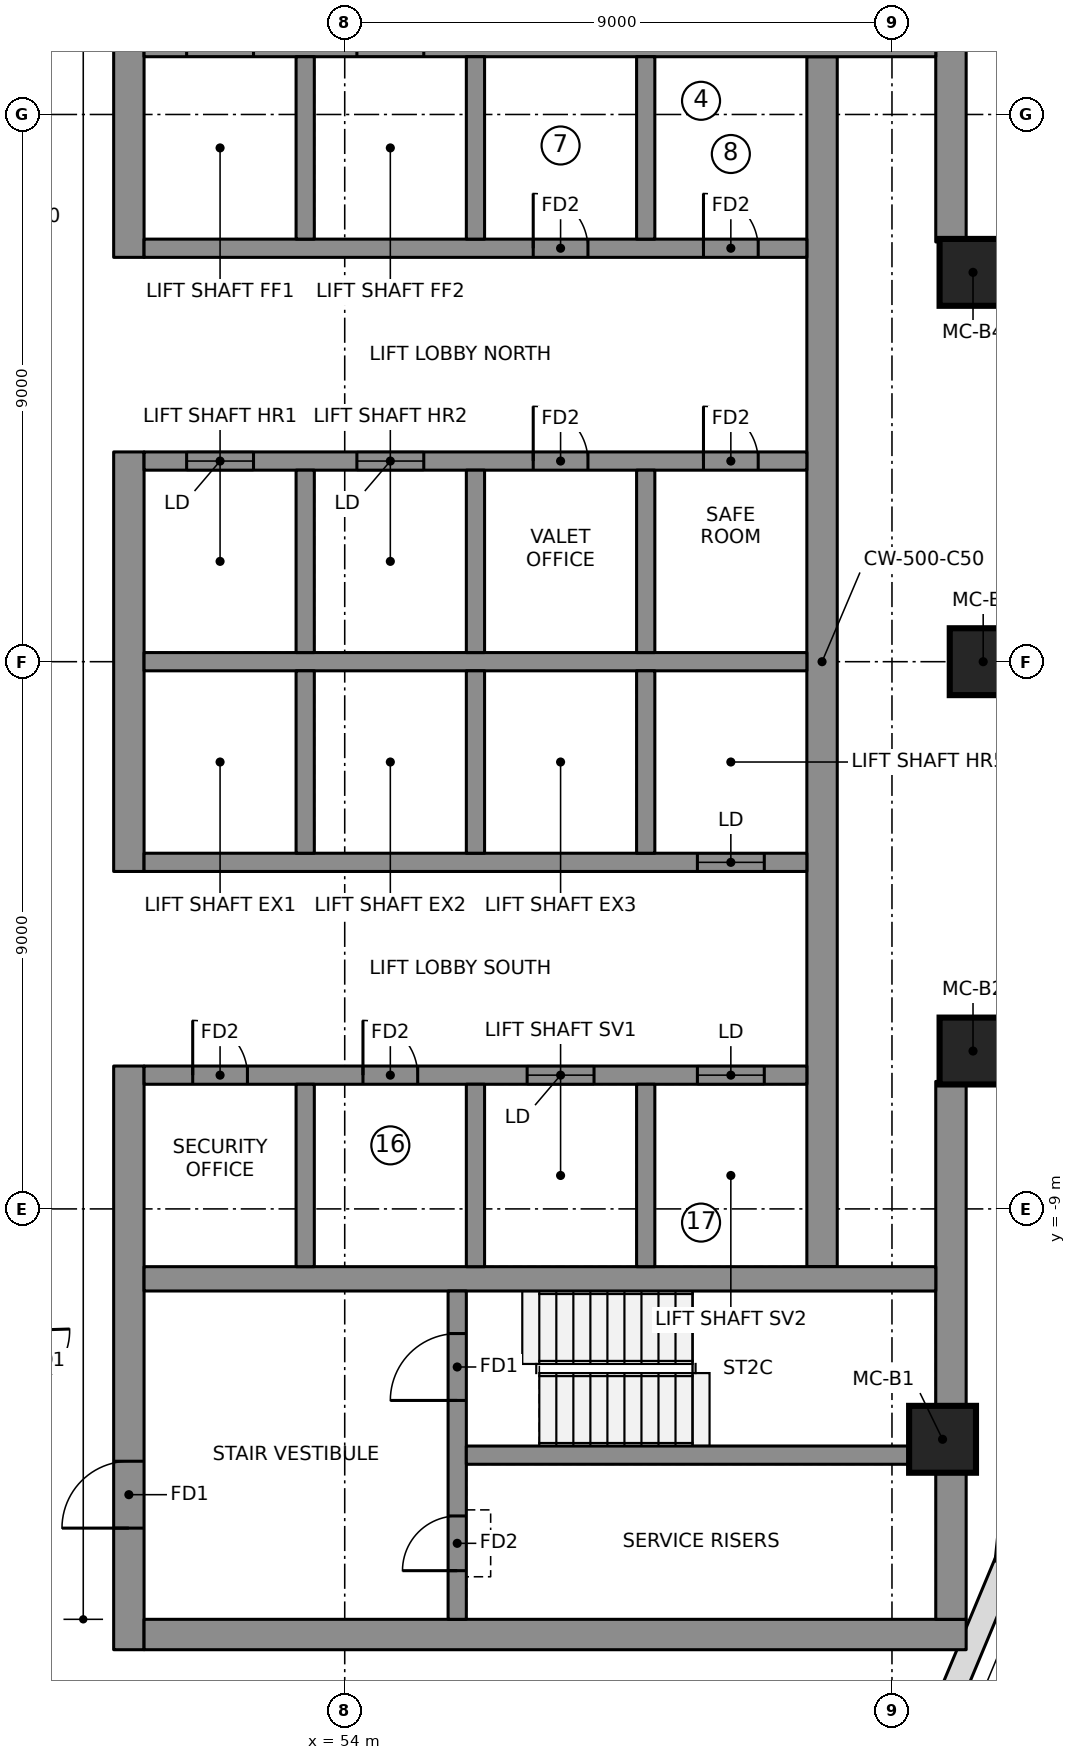
"""IFC4 building model, lengths in metres.
Left out: names, types, materials, properties, quantities, classifications, styles, units other than length and angle.
Written with IfcOpenShell. Run it as: python <this file> out.ifc"""

import sys

from ifc_helpers import new_model, si_unit, direction, frame, frame_2d, origin, origin_2d, place, context, subcontext, project, spatial, polyline, rectangle, outline, extrude, element, fill, save


model = new_model("IFC4")
c1 = context("Model", 3, precision=1e-05, world=origin(), true_north=direction((0.0, 1.0)))
c2 = subcontext(c1, "Body", "Model", "MODEL_VIEW")
j1 = project(units=[si_unit("LENGTHUNIT", "METRE"), si_unit("PLANEANGLEUNIT", "RADIAN")], contexts=[c1])
p1 = place(None, origin())
s1 = spatial("IfcSite", under=j1, at=p1, CompositionType="ELEMENT")
p2 = place(p1, origin())
s2 = spatial("IfcBuilding", under=s1, at=p2, CompositionType="ELEMENT")
p3 = place(p2, frame((0.0, 0.0, 285.65)))
s3 = spatial("IfcBuildingStorey", under=s2, at=p3, CompositionType="ELEMENT", Elevation=285.65)
p4 = place(p3, frame((50.45, 6.65, 0.0), z_axis=(0.0, 0.0, 1.0), x_axis=(0.0, 1.0, 0.0)))
e1 = element("IfcWall", 1, at=p4, inside=s3, PredefinedType="SHEAR", context=c2, shape_type="SweptSolid", body=[
    extrude(rectangle(XDim=9.6, YDim=0.5, at=frame_2d((4.8, 0.0))), origin(), (0.0, 0.0, 1.0), 3.55),
])
p5 = place(p4, frame((6.5, 0.0, 0.0)))
e2 = element("IfcOpeningElement", 2, at=p5, cuts=e1, PredefinedType="OPENING", context=c2, shape_type="SweptSolid", body=[
    extrude(rectangle(XDim=1.1, YDim=2.1, at=frame_2d((0.55, 1.05))), frame((0.0, 0.26, 0.0), z_axis=(0.0, -1.0, 0.0), x_axis=(1.0, 0.0, 0.0)), (0.0, 0.0, 1.0), 0.52),
])
p6 = place(p3, frame((50.45, -3.45, 0.0), z_axis=(0.0, 0.0, 1.0), x_axis=(0.0, 1.0, 0.0)))
e3 = element("IfcWall", 3, at=p6, inside=s3, PredefinedType="SHEAR", context=c2, shape_type="SweptSolid", body=[
    extrude(rectangle(XDim=6.9, YDim=0.5, at=frame_2d((3.45, 0.0))), origin(), (0.0, 0.0, 1.0), 3.55),
])
p7 = place(p3, frame((50.45, -16.25, 0.0), z_axis=(0.0, 0.0, 1.0), x_axis=(0.0, 1.0, 0.0)))
e4 = element("IfcWall", 4, at=p7, inside=s3, PredefinedType="SHEAR", context=c2, shape_type="SweptSolid", body=[
    extrude(rectangle(XDim=9.6, YDim=0.5, at=frame_2d((4.8, 0.0))), origin(), (0.0, 0.0, 1.0), 3.55),
])
p8 = place(p7, frame((2.0, 0.0, 0.0)))
e5 = element("IfcOpeningElement", 5, at=p8, cuts=e4, PredefinedType="OPENING", context=c2, shape_type="SweptSolid", body=[
    extrude(rectangle(XDim=1.1, YDim=2.1, at=frame_2d((0.55, 1.05))), frame((0.0, 0.26, 0.0), z_axis=(0.0, -1.0, 0.0), x_axis=(1.0, 0.0, 0.0)), (0.0, 0.0, 1.0), 0.52),
])
p9 = place(p3, frame((50.7, -16.0, 0.0), z_axis=(0.0, 0.0, 1.0), x_axis=(1.0, 0.0, 0.0)))
e6 = element("IfcWall", 6, at=p9, inside=s3, PredefinedType="SHEAR", context=c2, shape_type="SweptSolid", body=[
    extrude(rectangle(XDim=13.52, YDim=0.5, at=frame_2d((6.76, 0.0))), origin(), (0.0, 0.0, 1.0), 3.55),
])
for number, where, z_axis, x_axis in (
    (7, (63.97, 6.903, 0.0), (0.0, 0.0, 1.0), (0.0, 1.0, 0.0)),
    (8, (63.97, -15.75, 0.0), (0.0, 0.0, 1.0), (0.0, 1.0, 0.0)),
):
    element("IfcWall", number, at=place(p3, frame(where, z_axis=z_axis, x_axis=x_axis)), inside=s3, PredefinedType="SHEAR", context=c2, shape_type="SweptSolid", body=[
        extrude(rectangle(XDim=8.847, YDim=0.5, at=frame_2d((4.423, 0.0))), origin(), (0.0, 0.0, 1.0), 3.55),
    ])
p10 = place(p3, frame((61.85, -9.95, 0.0), z_axis=(0.0, 0.0, 1.0), x_axis=(0.0, 1.0, 0.0)))
e9 = element("IfcWall", 9, at=p10, inside=s3, PredefinedType="SHEAR", context=c2, shape_type="SweptSolid", body=[
    extrude(rectangle(XDim=19.9, YDim=0.5, at=frame_2d((9.95, 0.0))), origin(), (0.0, 0.0, 1.0), 3.55),
])
p11 = place(p3, frame((50.7, 10.15, 0.0), z_axis=(0.0, 0.0, 1.0), x_axis=(1.0, 0.0, 0.0)))
e10 = element("IfcWall", 10, at=p11, inside=s3, PredefinedType="SHEAR", context=c2, shape_type="SweptSolid", body=[
    extrude(rectangle(XDim=13.02, YDim=0.4, at=frame_2d((6.51, 0.0))), origin(), (0.0, 0.0, 1.0), 3.55),
])
p12 = place(p11, frame((0.7, 0.0, 0.0)))
e11 = element("IfcOpeningElement", 11, at=p12, cuts=e10, PredefinedType="OPENING", context=c2, shape_type="SweptSolid", body=[
    extrude(rectangle(XDim=1.1, YDim=2.1, at=frame_2d((0.55, 1.05))), frame((0.0, 0.21, 0.0), z_axis=(0.0, -1.0, 0.0), x_axis=(1.0, 0.0, 0.0)), (0.0, 0.0, 1.0), 0.42),
])
p13 = place(p11, frame((3.5, 0.0, 0.0)))
e12 = element("IfcOpeningElement", 12, at=p13, cuts=e10, PredefinedType="OPENING", context=c2, shape_type="SweptSolid", body=[
    extrude(rectangle(XDim=1.1, YDim=2.1, at=frame_2d((0.55, 1.05))), frame((0.0, 0.21, 0.0), z_axis=(0.0, -1.0, 0.0), x_axis=(1.0, 0.0, 0.0)), (0.0, 0.0, 1.0), 0.42),
])
p14 = place(p3, frame((50.7, -10.15, 0.0), z_axis=(0.0, 0.0, 1.0), x_axis=(1.0, 0.0, 0.0)))
e13 = element("IfcWall", 13, at=p14, inside=s3, PredefinedType="SHEAR", context=c2, shape_type="SweptSolid", body=[
    extrude(rectangle(XDim=13.02, YDim=0.4, at=frame_2d((6.51, 0.0))), origin(), (0.0, 0.0, 1.0), 3.55),
])
p15 = place(p3, frame((50.7, 0.0, 0.0), z_axis=(0.0, 0.0, 1.0), x_axis=(1.0, 0.0, 0.0)))
e14 = element("IfcWall", 14, at=p15, inside=s3, PredefinedType="SHEAR", context=c2, shape_type="SweptSolid", body=[
    extrude(rectangle(XDim=10.9, YDim=0.3, at=frame_2d((5.45, 0.0))), origin(), (0.0, 0.0, 1.0), 3.55),
])
p16 = place(p3, frame((50.7, 3.3, 0.0), z_axis=(0.0, 0.0, 1.0), x_axis=(1.0, 0.0, 0.0)))
e15 = element("IfcWall", 15, at=p16, inside=s3, PredefinedType="SHEAR", context=c2, shape_type="SweptSolid", body=[
    extrude(rectangle(XDim=10.9, YDim=0.3, at=frame_2d((5.45, 0.0))), origin(), (0.0, 0.0, 1.0), 3.55),
])
p17 = place(p16, frame((0.7, 0.0, 0.0)))
e16 = element("IfcOpeningElement", 16, at=p17, cuts=e15, PredefinedType="OPENING", context=c2, shape_type="SweptSolid", body=[
    extrude(rectangle(XDim=1.1, YDim=2.1, at=frame_2d((0.55, 1.05))), frame((0.0, 0.16, 0.0), z_axis=(0.0, -1.0, 0.0), x_axis=(1.0, 0.0, 0.0)), (0.0, 0.0, 1.0), 0.32),
])
p18 = place(p16, frame((3.5, 0.0, 0.0)))
e17 = element("IfcOpeningElement", 17, at=p18, cuts=e15, PredefinedType="OPENING", context=c2, shape_type="SweptSolid", body=[
    extrude(rectangle(XDim=1.1, YDim=2.1, at=frame_2d((0.55, 1.05))), frame((0.0, 0.16, 0.0), z_axis=(0.0, -1.0, 0.0), x_axis=(1.0, 0.0, 0.0)), (0.0, 0.0, 1.0), 0.32),
])
p19 = place(p16, frame((6.4, 0.0, 0.0)))
e18 = element("IfcOpeningElement", 18, at=p19, cuts=e15, PredefinedType="OPENING", context=c2, shape_type="SweptSolid", body=[
    extrude(rectangle(XDim=0.9, YDim=2.1, at=frame_2d((0.45, 1.05))), frame((0.0, 0.16, 0.0), z_axis=(0.0, -1.0, 0.0), x_axis=(1.0, 0.0, 0.0)), (0.0, 0.0, 1.0), 0.32),
])
p20 = place(p16, frame((9.2, 0.0, 0.0)))
e19 = element("IfcOpeningElement", 19, at=p20, cuts=e15, PredefinedType="OPENING", context=c2, shape_type="SweptSolid", body=[
    extrude(rectangle(XDim=0.9, YDim=2.1, at=frame_2d((0.45, 1.05))), frame((0.0, 0.16, 0.0), z_axis=(0.0, -1.0, 0.0), x_axis=(1.0, 0.0, 0.0)), (0.0, 0.0, 1.0), 0.32),
])
p21 = place(p3, frame((50.7, 6.8, 0.0), z_axis=(0.0, 0.0, 1.0), x_axis=(1.0, 0.0, 0.0)))
e20 = element("IfcWall", 20, at=p21, inside=s3, PredefinedType="SHEAR", context=c2, shape_type="SweptSolid", body=[
    extrude(rectangle(XDim=10.9, YDim=0.3, at=frame_2d((5.45, 0.0))), origin(), (0.0, 0.0, 1.0), 3.55),
])
p22 = place(p21, frame((6.4, 0.0, 0.0)))
e21 = element("IfcOpeningElement", 21, at=p22, cuts=e20, PredefinedType="OPENING", context=c2, shape_type="SweptSolid", body=[
    extrude(rectangle(XDim=0.9, YDim=2.1, at=frame_2d((0.45, 1.05))), frame((0.0, 0.16, 0.0), z_axis=(0.0, -1.0, 0.0), x_axis=(1.0, 0.0, 0.0)), (0.0, 0.0, 1.0), 0.32),
])
p23 = place(p21, frame((9.2, 0.0, 0.0)))
e22 = element("IfcOpeningElement", 22, at=p23, cuts=e20, PredefinedType="OPENING", context=c2, shape_type="SweptSolid", body=[
    extrude(rectangle(XDim=0.9, YDim=2.1, at=frame_2d((0.45, 1.05))), frame((0.0, 0.16, 0.0), z_axis=(0.0, -1.0, 0.0), x_axis=(1.0, 0.0, 0.0)), (0.0, 0.0, 1.0), 0.32),
])
for number, where, z_axis, x_axis in (
    (23, (53.35, 0.15, 0.0), (0.0, 0.0, 1.0), (0.0, 1.0, 0.0)),
    (24, (53.35, 6.95, 0.0), (0.0, 0.0, 1.0), (0.0, 1.0, 0.0)),
    (25, (56.15, 0.15, 0.0), (0.0, 0.0, 1.0), (0.0, 1.0, 0.0)),
    (26, (56.15, 6.95, 0.0), (0.0, 0.0, 1.0), (0.0, 1.0, 0.0)),
    (27, (58.95, 0.15, 0.0), (0.0, 0.0, 1.0), (0.0, 1.0, 0.0)),
    (28, (58.95, 6.95, 0.0), (0.0, 0.0, 1.0), (0.0, 1.0, 0.0)),
):
    element("IfcWall", number, at=place(p3, frame(where, z_axis=z_axis, x_axis=x_axis)), inside=s3, PredefinedType="SHEAR", context=c2, shape_type="SweptSolid", body=[
        extrude(rectangle(XDim=3.0, YDim=0.3, at=frame_2d((1.5, 0.0))), origin(), (0.0, 0.0, 1.0), 3.55),
    ])
p24 = place(p3, frame((50.7, -3.3, 0.0), z_axis=(0.0, 0.0, 1.0), x_axis=(1.0, 0.0, 0.0)))
e29 = element("IfcWall", 29, at=p24, inside=s3, PredefinedType="SHEAR", context=c2, shape_type="SweptSolid", body=[
    extrude(rectangle(XDim=10.9, YDim=0.3, at=frame_2d((5.45, 0.0))), origin(), (0.0, 0.0, 1.0), 3.55),
])
p25 = place(p24, frame((9.1, 0.0, 0.0)))
e30 = element("IfcOpeningElement", 30, at=p25, cuts=e29, PredefinedType="OPENING", context=c2, shape_type="SweptSolid", body=[
    extrude(rectangle(XDim=1.1, YDim=2.1, at=frame_2d((0.55, 1.05))), frame((0.0, 0.16, 0.0), z_axis=(0.0, -1.0, 0.0), x_axis=(1.0, 0.0, 0.0)), (0.0, 0.0, 1.0), 0.32),
])
p26 = place(p3, frame((50.7, -6.8, 0.0), z_axis=(0.0, 0.0, 1.0), x_axis=(1.0, 0.0, 0.0)))
e31 = element("IfcWall", 31, at=p26, inside=s3, PredefinedType="SHEAR", context=c2, shape_type="SweptSolid", body=[
    extrude(rectangle(XDim=10.9, YDim=0.3, at=frame_2d((5.45, 0.0))), origin(), (0.0, 0.0, 1.0), 3.55),
])
p27 = place(p26, frame((6.3, 0.0, 0.0)))
e32 = element("IfcOpeningElement", 32, at=p27, cuts=e31, PredefinedType="OPENING", context=c2, shape_type="SweptSolid", body=[
    extrude(rectangle(XDim=1.1, YDim=2.1, at=frame_2d((0.55, 1.05))), frame((0.0, 0.16, 0.0), z_axis=(0.0, -1.0, 0.0), x_axis=(1.0, 0.0, 0.0)), (0.0, 0.0, 1.0), 0.32),
])
p28 = place(p26, frame((9.1, 0.0, 0.0)))
e33 = element("IfcOpeningElement", 33, at=p28, cuts=e31, PredefinedType="OPENING", context=c2, shape_type="SweptSolid", body=[
    extrude(rectangle(XDim=1.1, YDim=2.1, at=frame_2d((0.55, 1.05))), frame((0.0, 0.16, 0.0), z_axis=(0.0, -1.0, 0.0), x_axis=(1.0, 0.0, 0.0)), (0.0, 0.0, 1.0), 0.32),
])
p29 = place(p26, frame((0.8, 0.0, 0.0)))
e34 = element("IfcOpeningElement", 34, at=p29, cuts=e31, PredefinedType="OPENING", context=c2, shape_type="SweptSolid", body=[
    extrude(rectangle(XDim=0.9, YDim=2.1, at=frame_2d((0.45, 1.05))), frame((0.0, 0.16, 0.0), z_axis=(0.0, -1.0, 0.0), x_axis=(1.0, 0.0, 0.0)), (0.0, 0.0, 1.0), 0.32),
])
p30 = place(p26, frame((3.6, 0.0, 0.0)))
e35 = element("IfcOpeningElement", 35, at=p30, cuts=e31, PredefinedType="OPENING", context=c2, shape_type="SweptSolid", body=[
    extrude(rectangle(XDim=0.9, YDim=2.1, at=frame_2d((0.45, 1.05))), frame((0.0, 0.16, 0.0), z_axis=(0.0, -1.0, 0.0), x_axis=(1.0, 0.0, 0.0)), (0.0, 0.0, 1.0), 0.32),
])
for number, where, z_axis, x_axis in (
    (36, (53.35, -3.15, 0.0), (0.0, 0.0, 1.0), (0.0, 1.0, 0.0)),
    (37, (53.35, -9.95, 0.0), (0.0, 0.0, 1.0), (0.0, 1.0, 0.0)),
    (38, (56.15, -3.15, 0.0), (0.0, 0.0, 1.0), (0.0, 1.0, 0.0)),
    (39, (56.15, -9.95, 0.0), (0.0, 0.0, 1.0), (0.0, 1.0, 0.0)),
    (40, (58.95, -3.15, 0.0), (0.0, 0.0, 1.0), (0.0, 1.0, 0.0)),
    (41, (58.95, -9.95, 0.0), (0.0, 0.0, 1.0), (0.0, 1.0, 0.0)),
):
    element("IfcWall", number, at=place(p3, frame(where, z_axis=z_axis, x_axis=x_axis)), inside=s3, PredefinedType="SHEAR", context=c2, shape_type="SweptSolid", body=[
        extrude(rectangle(XDim=3.0, YDim=0.3, at=frame_2d((1.5, 0.0))), origin(), (0.0, 0.0, 1.0), 3.55),
    ])
p31 = place(p3, frame((55.85, -15.75, 0.0), z_axis=(0.0, 0.0, 1.0), x_axis=(0.0, 1.0, 0.0)))
e42 = element("IfcWall", 42, at=p31, inside=s3, PredefinedType="SHEAR", context=c2, shape_type="SweptSolid", body=[
    extrude(rectangle(XDim=5.4, YDim=0.3, at=frame_2d((2.7, 0.0))), origin(), (0.0, 0.0, 1.0), 3.55),
])
p32 = place(p31, frame((3.6, 0.0, 0.0)))
e43 = element("IfcOpeningElement", 43, at=p32, cuts=e42, PredefinedType="OPENING", context=c2, shape_type="SweptSolid", body=[
    extrude(rectangle(XDim=1.1, YDim=2.1, at=frame_2d((0.55, 1.05))), frame((0.0, 0.16, 0.0), z_axis=(0.0, -1.0, 0.0), x_axis=(1.0, 0.0, 0.0)), (0.0, 0.0, 1.0), 0.32),
])
p33 = place(p31, frame((0.8, 0.0, 0.0)))
e44 = element("IfcOpeningElement", 44, at=p33, cuts=e42, PredefinedType="OPENING", context=c2, shape_type="SweptSolid", body=[
    extrude(rectangle(XDim=0.9, YDim=2.1, at=frame_2d((0.45, 1.05))), frame((0.0, 0.16, 0.0), z_axis=(0.0, -1.0, 0.0), x_axis=(1.0, 0.0, 0.0)), (0.0, 0.0, 1.0), 0.32),
])
p34 = place(p3, frame((56.0, -13.05, 0.0), z_axis=(0.0, 0.0, 1.0), x_axis=(1.0, 0.0, 0.0)))
e45 = element("IfcWall", 45, at=p34, inside=s3, PredefinedType="SHEAR", context=c2, shape_type="SweptSolid", body=[
    extrude(rectangle(XDim=7.72, YDim=0.3, at=frame_2d((3.86, 0.0))), origin(), (0.0, 0.0, 1.0), 3.55),
])
for number, where, z_axis, x_axis in (
    (46, (63.832, -12.789, 0.0), (0.0, 0.0, 1.0), (1.0, 0.0, 0.0)),
    (47, (64.333, -6.403, 0.0), (0.0, 0.0, 1.0), (1.0, 0.0, 0.0)),
    (48, (64.5, 0.0, 0.0), (0.0, 0.0, 1.0), (1.0, 0.0, 0.0)),
    (49, (64.333, 6.403, 0.0), (0.0, 0.0, 1.0), (1.0, 0.0, 0.0)),
):
    element("IfcColumn", number, at=place(p3, frame(where, z_axis=z_axis, x_axis=x_axis)), inside=s3, PredefinedType="COLUMN", context=c2, shape_type="SweptSolid", body=[
        extrude(rectangle(XDim=1.1, YDim=1.1, at=origin_2d()), origin(), (0.0, 0.0, 1.0), 3.55),
    ])
p35 = place(p3, frame((63.474, -18.194, 0.0), z_axis=(0.0, 0.0, 1.0), x_axis=(0.385285857918, 0.922797273343, 0.0)))
e50 = element("IfcWall", 50, at=p35, inside=s3, PredefinedType="NOTDEFINED", context=c2, shape_type="SweptSolid", body=[
    extrude(outline(polyline([(-0.057, -0.2), (3.726, -0.2), (3.667, 0.2), (0.057, 0.2), (-0.057, -0.2)])), origin(), (0.0, 0.0, 1.0), 3.25),
])
p36 = place(p3, frame((64.898, -14.782, 0.0), z_axis=(0.0, 0.0, 1.0), x_axis=(0.102249826987, 0.994758751096, 0.0)))
e51 = element("IfcWall", 51, at=p36, inside=s3, PredefinedType="NOTDEFINED", context=c2, shape_type="SweptSolid", body=[
    extrude(outline(polyline([(-0.03, -0.2), (4.237, -0.2), (4.23, 0.2), (0.03, 0.2), (-0.03, -0.2)])), origin(), (0.0, 0.0, 1.0), 3.25),
])
p37 = place(p17, origin())
e52 = element("IfcDoor", 52, at=p37, inside=s3, OperationType="DOUBLE_DOOR_SLIDING", PredefinedType="DOOR", context=c2, shape_type="SweptSolid", body=[
    extrude(rectangle(XDim=1.1, YDim=2.1, at=frame_2d((0.55, 1.05))), frame((0.0, 0.025, 0.0), z_axis=(0.0, -1.0, 0.0), x_axis=(1.0, 0.0, 0.0)), (0.0, 0.0, 1.0), 0.05),
])
fill(e16, e52)
p38 = place(p18, origin())
e53 = element("IfcDoor", 53, at=p38, inside=s3, OperationType="DOUBLE_DOOR_SLIDING", PredefinedType="DOOR", context=c2, shape_type="SweptSolid", body=[
    extrude(rectangle(XDim=1.1, YDim=2.1, at=frame_2d((0.55, 1.05))), frame((0.0, 0.025, 0.0), z_axis=(0.0, -1.0, 0.0), x_axis=(1.0, 0.0, 0.0)), (0.0, 0.0, 1.0), 0.05),
])
fill(e17, e53)
p39 = place(p25, origin())
e54 = element("IfcDoor", 54, at=p39, inside=s3, OperationType="DOUBLE_DOOR_SLIDING", PredefinedType="DOOR", context=c2, shape_type="SweptSolid", body=[
    extrude(rectangle(XDim=1.1, YDim=2.1, at=frame_2d((0.55, 1.05))), frame((0.0, 0.025, 0.0), z_axis=(0.0, -1.0, 0.0), x_axis=(1.0, 0.0, 0.0)), (0.0, 0.0, 1.0), 0.05),
])
fill(e30, e54)
p40 = place(p27, origin())
e55 = element("IfcDoor", 55, at=p40, inside=s3, OperationType="DOUBLE_DOOR_SLIDING", PredefinedType="DOOR", context=c2, shape_type="SweptSolid", body=[
    extrude(rectangle(XDim=1.1, YDim=2.1, at=frame_2d((0.55, 1.05))), frame((0.0, 0.025, 0.0), z_axis=(0.0, -1.0, 0.0), x_axis=(1.0, 0.0, 0.0)), (0.0, 0.0, 1.0), 0.05),
])
fill(e32, e55)
p41 = place(p28, origin())
e56 = element("IfcDoor", 56, at=p41, inside=s3, OperationType="DOUBLE_DOOR_SLIDING", PredefinedType="DOOR", context=c2, shape_type="SweptSolid", body=[
    extrude(rectangle(XDim=1.1, YDim=2.1, at=frame_2d((0.55, 1.05))), frame((0.0, 0.025, 0.0), z_axis=(0.0, -1.0, 0.0), x_axis=(1.0, 0.0, 0.0)), (0.0, 0.0, 1.0), 0.05),
])
fill(e33, e56)
p42 = place(p32, origin())
e57 = element("IfcDoor", 57, at=p42, inside=s3, OperationType="SINGLE_SWING_RIGHT", PredefinedType="DOOR", context=c2, shape_type="SweptSolid", body=[
    extrude(rectangle(XDim=1.1, YDim=2.1, at=frame_2d((0.55, 1.05))), frame((0.0, 0.025, 0.0), z_axis=(0.0, -1.0, 0.0), x_axis=(1.0, 0.0, 0.0)), (0.0, 0.0, 1.0), 0.05),
])
fill(e43, e57)
p43 = place(p8, origin())
e58 = element("IfcDoor", 58, at=p43, inside=s3, OperationType="SINGLE_SWING_RIGHT", PredefinedType="DOOR", context=c2, shape_type="SweptSolid", body=[
    extrude(rectangle(XDim=1.1, YDim=2.1, at=frame_2d((0.55, 1.05))), frame((0.0, 0.025, 0.0), z_axis=(0.0, -1.0, 0.0), x_axis=(1.0, 0.0, 0.0)), (0.0, 0.0, 1.0), 0.05),
])
fill(e5, e58)
p44 = place(p33, origin())
e59 = element("IfcDoor", 59, at=p44, inside=s3, OperationType="SINGLE_SWING_LEFT", PredefinedType="DOOR", context=c2, shape_type="SweptSolid", body=[
    extrude(rectangle(XDim=0.9, YDim=2.1, at=frame_2d((0.45, 1.05))), frame((0.0, 0.025, 0.0), z_axis=(0.0, -1.0, 0.0), x_axis=(1.0, 0.0, 0.0)), (0.0, 0.0, 1.0), 0.05),
])
fill(e44, e59)
p45 = place(p22, origin())
e60 = element("IfcDoor", 60, at=p45, inside=s3, OperationType="SINGLE_SWING_LEFT", PredefinedType="DOOR", context=c2, shape_type="SweptSolid", body=[
    extrude(rectangle(XDim=0.9, YDim=2.1, at=frame_2d((0.45, 1.05))), frame((0.0, 0.025, 0.0), z_axis=(0.0, -1.0, 0.0), x_axis=(1.0, 0.0, 0.0)), (0.0, 0.0, 1.0), 0.05),
])
fill(e21, e60)
p46 = place(p23, origin())
e61 = element("IfcDoor", 61, at=p46, inside=s3, OperationType="SINGLE_SWING_LEFT", PredefinedType="DOOR", context=c2, shape_type="SweptSolid", body=[
    extrude(rectangle(XDim=0.9, YDim=2.1, at=frame_2d((0.45, 1.05))), frame((0.0, 0.025, 0.0), z_axis=(0.0, -1.0, 0.0), x_axis=(1.0, 0.0, 0.0)), (0.0, 0.0, 1.0), 0.05),
])
fill(e22, e61)
p47 = place(p19, origin())
e62 = element("IfcDoor", 62, at=p47, inside=s3, OperationType="SINGLE_SWING_LEFT", PredefinedType="DOOR", context=c2, shape_type="SweptSolid", body=[
    extrude(rectangle(XDim=0.9, YDim=2.1, at=frame_2d((0.45, 1.05))), frame((0.0, 0.025, 0.0), z_axis=(0.0, -1.0, 0.0), x_axis=(1.0, 0.0, 0.0)), (0.0, 0.0, 1.0), 0.05),
])
fill(e18, e62)
p48 = place(p20, origin())
e63 = element("IfcDoor", 63, at=p48, inside=s3, OperationType="SINGLE_SWING_LEFT", PredefinedType="DOOR", context=c2, shape_type="SweptSolid", body=[
    extrude(rectangle(XDim=0.9, YDim=2.1, at=frame_2d((0.45, 1.05))), frame((0.0, 0.025, 0.0), z_axis=(0.0, -1.0, 0.0), x_axis=(1.0, 0.0, 0.0)), (0.0, 0.0, 1.0), 0.05),
])
fill(e19, e63)
p49 = place(p29, origin())
e64 = element("IfcDoor", 64, at=p49, inside=s3, OperationType="SINGLE_SWING_LEFT", PredefinedType="DOOR", context=c2, shape_type="SweptSolid", body=[
    extrude(rectangle(XDim=0.9, YDim=2.1, at=frame_2d((0.45, 1.05))), frame((0.0, 0.025, 0.0), z_axis=(0.0, -1.0, 0.0), x_axis=(1.0, 0.0, 0.0)), (0.0, 0.0, 1.0), 0.05),
])
fill(e34, e64)
p50 = place(p30, origin())
e65 = element("IfcDoor", 65, at=p50, inside=s3, OperationType="SINGLE_SWING_LEFT", PredefinedType="DOOR", context=c2, shape_type="SweptSolid", body=[
    extrude(rectangle(XDim=0.9, YDim=2.1, at=frame_2d((0.45, 1.05))), frame((0.0, 0.025, 0.0), z_axis=(0.0, -1.0, 0.0), x_axis=(1.0, 0.0, 0.0)), (0.0, 0.0, 1.0), 0.05),
])
fill(e35, e65)
save(model, sys.argv[1])
